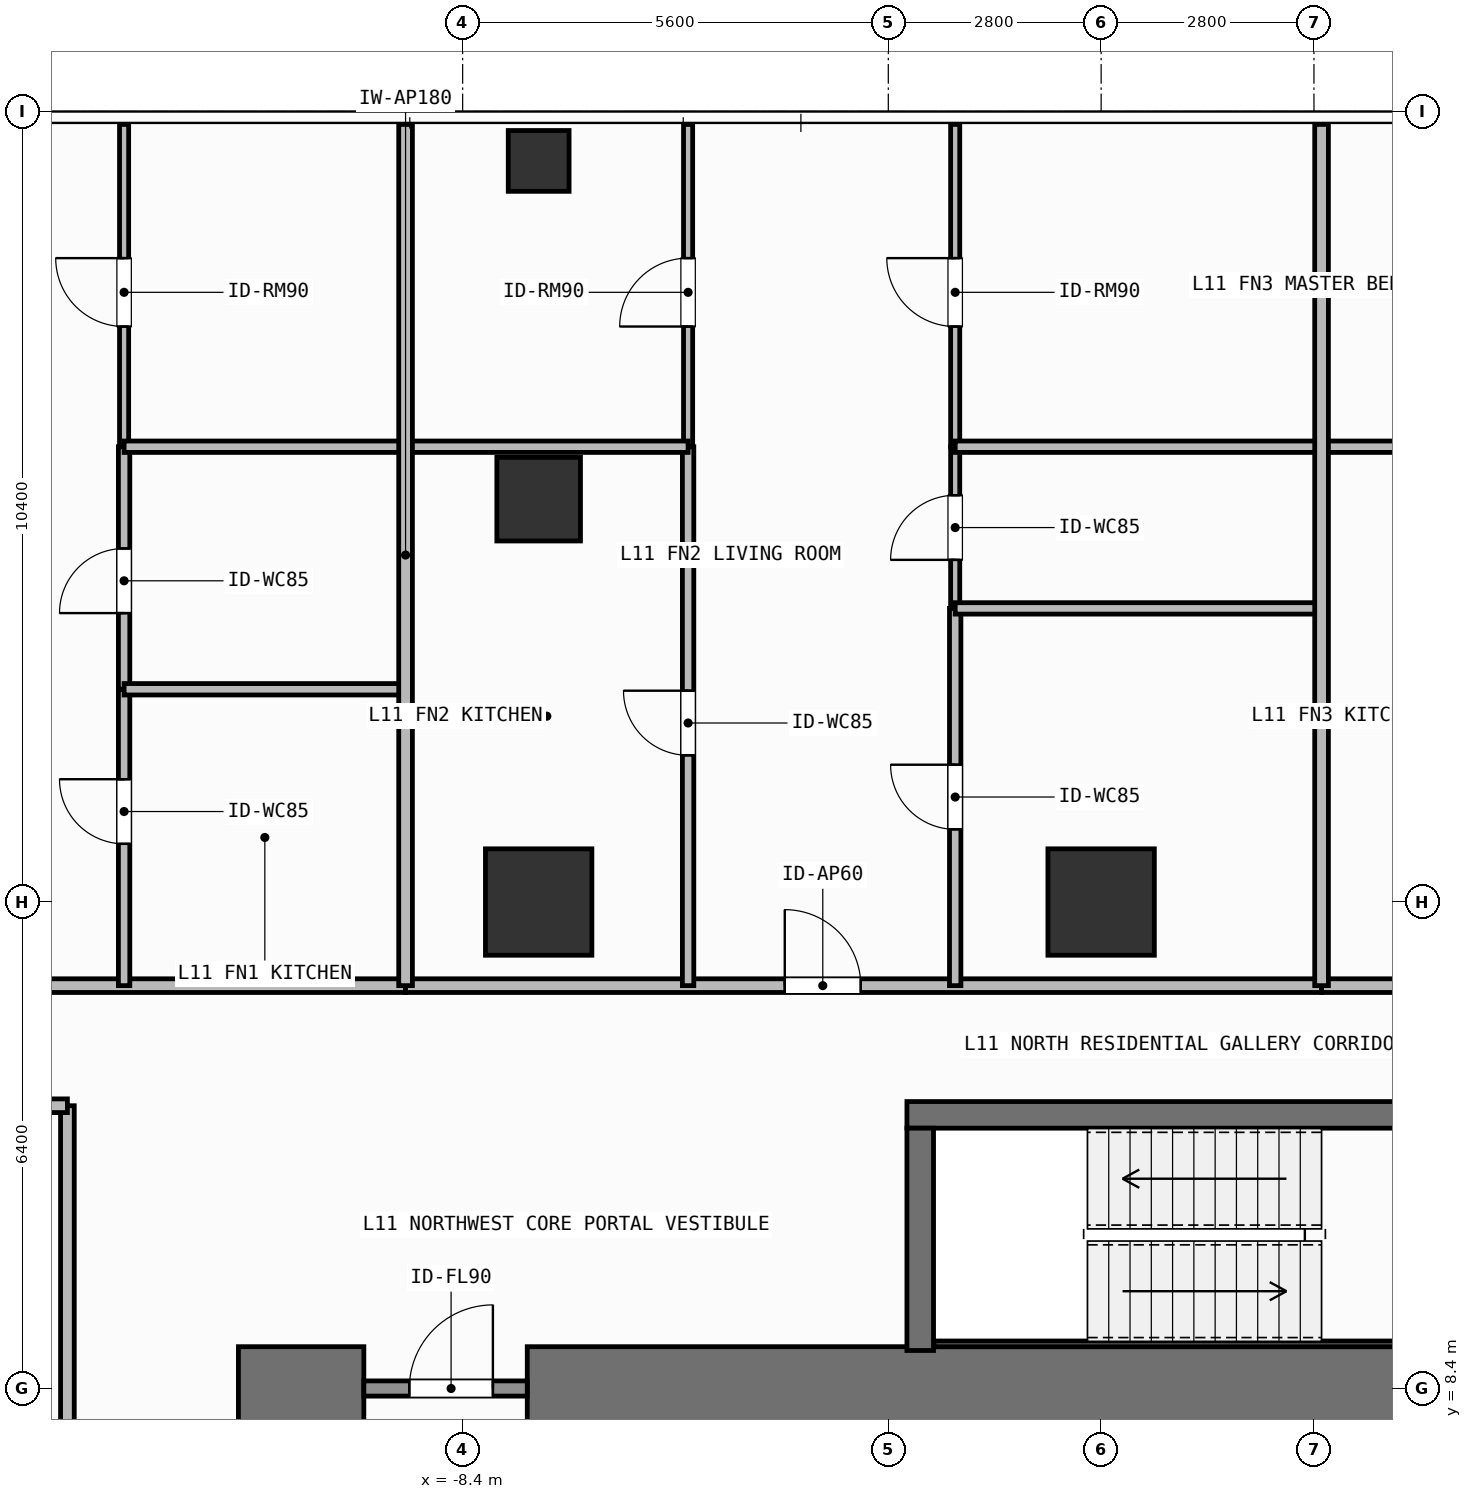
"""IFC4 building model, lengths in metres.
Left out: names, types, materials, properties, quantities, classifications, styles, units other than length and angle.
Written with IfcOpenShell. Run it as: python <this file> out.ifc"""

import sys

from ifc_helpers import new_model, si_unit, direction, frame, frame_2d, origin, origin_2d, place, context, subcontext, project, spatial, rectangle, hollow_rectangle, extrude, element, fill, save


model = new_model("IFC4")
c1 = context("Model", 3, precision=1e-05, world=origin(), true_north=direction((0.0, 1.0)))
c2 = subcontext(c1, "Body", "Model", "MODEL_VIEW")
j1 = project(units=[si_unit("LENGTHUNIT", "METRE"), si_unit("PLANEANGLEUNIT", "RADIAN")], contexts=[c1])
p1 = place(None, origin())
s1 = spatial("IfcSite", under=j1, at=p1, CompositionType="ELEMENT")
p2 = place(p1, origin())
s2 = spatial("IfcBuilding", under=s1, at=p2, CompositionType="ELEMENT")
p3 = place(p2, frame((0.0, 0.0, 42.3)))
s3 = spatial("IfcBuildingStorey", under=s2, at=p3, CompositionType="ELEMENT", Elevation=42.3)
p4 = place(p3, frame((-11.35, 8.4, 0.0), z_axis=(0.0, 0.0, 1.0), x_axis=(1.0, 0.0, 0.0)))
e1 = element("IfcWall", 1, at=p4, inside=s3, PredefinedType="SHEAR", context=c2, shape_type="SweptSolid", body=[
    extrude(rectangle(XDim=1.65, YDim=1.1, at=frame_2d((0.825, 0.0))), origin(), (0.0, 0.0, 1.0), 3.9),
])
p5 = place(p3, frame((-7.55, 8.4, 0.0), z_axis=(0.0, 0.0, 1.0), x_axis=(1.0, 0.0, 0.0)))
e2 = element("IfcWall", 2, at=p5, inside=s3, PredefinedType="SHEAR", context=c2, shape_type="SweptSolid", body=[
    extrude(rectangle(XDim=16.5, YDim=1.1, at=frame_2d((8.25, 0.0))), origin(), (0.0, 0.0, 1.0), 3.9),
])
p6 = place(p3, frame((-2.555, 12.0, 0.0), z_axis=(0.0, 0.0, 1.0), x_axis=(1.0, 0.0, 0.0)))
e3 = element("IfcWall", 3, at=p6, inside=s3, PredefinedType="SHEAR", context=c2, shape_type="SweptSolid", body=[
    extrude(rectangle(XDim=7.31, YDim=0.35, at=frame_2d((3.655, 0.0))), origin(), (0.0, 0.0, 1.0), 3.9),
])
p7 = place(p3, frame((-2.2, 8.988, 0.0), z_axis=(0.0, 0.0, 1.0), x_axis=(1.0, 0.0, 0.0)))
e4 = element("IfcWall", 4, at=p7, inside=s3, PredefinedType="SHEAR", context=c2, shape_type="SweptSolid", body=[
    extrude(rectangle(XDim=6.6, YDim=0.075, at=frame_2d((3.3, 0.0))), origin(), (0.0, 0.0, 1.0), 3.9),
])
p8 = place(p3, frame((-2.38, 8.9, 0.0), z_axis=(0.0, 0.0, 1.0), x_axis=(0.0, 1.0, 0.0)))
e5 = element("IfcWall", 5, at=p8, inside=s3, PredefinedType="SHEAR", context=c2, shape_type="SweptSolid", body=[
    extrude(rectangle(XDim=2.925, YDim=0.35, at=frame_2d((1.462, 0.0))), origin(), (0.0, 0.0, 1.0), 3.9),
])
for number, where, z_axis, x_axis in (
    (6, (-7.4, 14.8, 0.0), (0.0, 0.0, 1.0), (1.0, 0.0, 0.0)),
    (7, (0.0, 14.8, 0.0), (0.0, 0.0, 1.0), (1.0, 0.0, 0.0)),
):
    element("IfcColumn", number, at=place(p3, frame(where, z_axis=z_axis, x_axis=x_axis)), inside=s3, PredefinedType="COLUMN", context=c2, shape_type="SweptSolid", body=[
        extrude(rectangle(XDim=1.4, YDim=1.4, at=origin_2d()), origin(), (0.0, 0.0, 1.0), 3.9),
    ])
p9 = place(p3, frame((-7.4, 20.1, 0.0), z_axis=(0.0, 0.0, 1.0), x_axis=(1.0, 0.0, 0.0)))
e8 = element("IfcColumn", 8, at=p9, inside=s3, PredefinedType="COLUMN", context=c2, shape_type="SweptSolid", body=[
    extrude(rectangle(XDim=1.1, YDim=1.1, at=origin_2d()), origin(), (0.0, 0.0, 1.0), 3.9),
])
p10 = place(p3, frame((-7.4, 24.55, 0.0), z_axis=(0.0, 0.0, 1.0), x_axis=(1.0, 0.0, 0.0)))
e9 = element("IfcColumn", 9, at=p10, inside=s3, PredefinedType="COLUMN", context=c2, shape_type="SweptSolid", body=[
    extrude(hollow_rectangle(XDim=0.8, YDim=0.8, WallThickness=0.036, at=origin_2d()), origin(), (0.0, 0.0, 1.0), 3.9),
])
p11 = place(p3, frame((-9.7, 8.4, 0.0), z_axis=(0.0, 0.0, 1.0), x_axis=(1.0, 0.0, 0.0)))
e10 = element("IfcWall", 10, at=p11, inside=s3, PredefinedType="SOLIDWALL", context=c2, shape_type="SweptSolid", body=[
    extrude(rectangle(XDim=2.15, YDim=0.2, at=frame_2d((1.075, 0.0))), origin(), (0.0, 0.0, 1.0), 2.72),
])
p12 = place(p11, frame((0.598, 0.0, 0.0)))
e11 = element("IfcOpeningElement", 11, at=p12, cuts=e10, PredefinedType="OPENING", context=c2, shape_type="SweptSolid", body=[
    extrude(rectangle(XDim=1.1, YDim=2.15, at=frame_2d((0.55, 1.075))), frame((0.0, 0.11, 0.0), z_axis=(0.0, -1.0, 0.0), x_axis=(1.0, 0.0, 0.0)), (0.0, 0.0, 1.0), 0.22),
])
p13 = place(p3, frame((-18.62, 13.7, 0.0), z_axis=(0.0, 0.0, 1.0), x_axis=(1.0, 0.0, 0.0)))
e12 = element("IfcWall", 12, at=p13, inside=s3, PredefinedType="PARTITIONING", context=c2, shape_type="SweptSolid", body=[
    extrude(rectangle(XDim=9.469, YDim=0.18, at=frame_2d((4.735, 0.0))), origin(), (0.0, 0.0, 1.0), 3.68),
])
p14 = place(p13, frame((1.931, 0.0, 0.0)))
e13 = element("IfcOpeningElement", 13, at=p14, cuts=e12, PredefinedType="OPENING", context=c2, shape_type="SweptSolid", body=[
    extrude(rectangle(XDim=1.0, YDim=2.2, at=frame_2d((0.5, 1.1))), frame((0.0, 0.1, 0.0), z_axis=(0.0, -1.0, 0.0), x_axis=(1.0, 0.0, 0.0)), (0.0, 0.0, 1.0), 0.2),
])
p15 = place(p3, frame((-12.854, 13.7, 0.0), z_axis=(0.0, 0.0, 1.0), x_axis=(0.0, 1.0, 0.0)))
e14 = element("IfcWall", 14, at=p15, inside=s3, PredefinedType="PARTITIONING", context=c2, shape_type="SweptSolid", body=[
    extrude(rectangle(XDim=3.899, YDim=0.15, at=frame_2d((1.95, 0.0))), origin(), (0.0, 0.0, 1.0), 3.68),
])
p16 = place(p15, frame((1.865, 0.0, 0.0)))
e15 = element("IfcOpeningElement", 15, at=p16, cuts=e14, PredefinedType="OPENING", context=c2, shape_type="SweptSolid", body=[
    extrude(rectangle(XDim=0.85, YDim=2.1, at=frame_2d((0.425, 1.05))), frame((0.0, 0.085, 0.0), z_axis=(0.0, -1.0, 0.0), x_axis=(1.0, 0.0, 0.0)), (0.0, 0.0, 1.0), 0.17),
])
p17 = place(p3, frame((-12.854, 17.599, 0.0), z_axis=(0.0, 0.0, 1.0), x_axis=(0.0, 1.0, 0.0)))
e16 = element("IfcWall", 16, at=p17, inside=s3, PredefinedType="PARTITIONING", context=c2, shape_type="SweptSolid", body=[
    extrude(rectangle(XDim=3.191, YDim=0.15, at=frame_2d((1.595, 0.0))), origin(), (0.0, 0.0, 1.0), 3.68),
])
p18 = place(p17, frame((1.002, 0.0, 0.0)))
e17 = element("IfcOpeningElement", 17, at=p18, cuts=e16, PredefinedType="OPENING", context=c2, shape_type="SweptSolid", body=[
    extrude(rectangle(XDim=0.85, YDim=2.1, at=frame_2d((0.425, 1.05))), frame((0.0, 0.085, 0.0), z_axis=(0.0, -1.0, 0.0), x_axis=(1.0, 0.0, 0.0)), (0.0, 0.0, 1.0), 0.17),
])
p19 = place(p3, frame((-12.854, 20.79, 0.0), z_axis=(0.0, 0.0, 1.0), x_axis=(0.0, 1.0, 0.0)))
e18 = element("IfcWall", 18, at=p19, inside=s3, PredefinedType="PARTITIONING", context=c2, shape_type="SweptSolid", body=[
    extrude(rectangle(XDim=4.24, YDim=0.12, at=frame_2d((2.12, 0.0))), origin(), (0.0, 0.0, 1.0), 3.68),
])
p20 = place(p19, frame((1.581, 0.0, 0.0)))
e19 = element("IfcOpeningElement", 19, at=p20, cuts=e18, PredefinedType="OPENING", context=c2, shape_type="SweptSolid", body=[
    extrude(rectangle(XDim=0.9, YDim=2.1, at=frame_2d((0.45, 1.05))), frame((0.0, 0.07, 0.0), z_axis=(0.0, -1.0, 0.0), x_axis=(1.0, 0.0, 0.0)), (0.0, 0.0, 1.0), 0.14),
])
p21 = place(p3, frame((-9.151, 13.7, 0.0), z_axis=(0.0, 0.0, 1.0), x_axis=(1.0, 0.0, 0.0)))
e20 = element("IfcWall", 20, at=p21, inside=s3, PredefinedType="PARTITIONING", context=c2, shape_type="SweptSolid", body=[
    extrude(rectangle(XDim=12.051, YDim=0.18, at=frame_2d((6.025, 0.0))), origin(), (0.0, 0.0, 1.0), 3.68),
])
p22 = place(p21, frame((4.989, 0.0, 0.0)))
e21 = element("IfcOpeningElement", 21, at=p22, cuts=e20, PredefinedType="OPENING", context=c2, shape_type="SweptSolid", body=[
    extrude(rectangle(XDim=1.0, YDim=2.2, at=frame_2d((0.5, 1.1))), frame((0.0, 0.1, 0.0), z_axis=(0.0, -1.0, 0.0), x_axis=(1.0, 0.0, 0.0)), (0.0, 0.0, 1.0), 0.2),
])
p23 = place(p3, frame((-5.434, 13.7, 0.0), z_axis=(0.0, 0.0, 1.0), x_axis=(0.0, 1.0, 0.0)))
e22 = element("IfcWall", 22, at=p23, inside=s3, PredefinedType="PARTITIONING", context=c2, shape_type="SweptSolid", body=[
    extrude(rectangle(XDim=7.09, YDim=0.15, at=frame_2d((3.545, 0.0))), origin(), (0.0, 0.0, 1.0), 3.68),
])
p24 = place(p23, frame((3.03, 0.0, 0.0)))
e23 = element("IfcOpeningElement", 23, at=p24, cuts=e22, PredefinedType="OPENING", context=c2, shape_type="SweptSolid", body=[
    extrude(rectangle(XDim=0.85, YDim=2.1, at=frame_2d((0.425, 1.05))), frame((0.0, 0.085, 0.0), z_axis=(0.0, -1.0, 0.0), x_axis=(1.0, 0.0, 0.0)), (0.0, 0.0, 1.0), 0.17),
])
p25 = place(p3, frame((-5.434, 20.79, 0.0), z_axis=(0.0, 0.0, 1.0), x_axis=(0.0, 1.0, 0.0)))
e24 = element("IfcWall", 24, at=p25, inside=s3, PredefinedType="PARTITIONING", context=c2, shape_type="SweptSolid", body=[
    extrude(rectangle(XDim=4.24, YDim=0.12, at=frame_2d((2.12, 0.0))), origin(), (0.0, 0.0, 1.0), 3.68),
])
p26 = place(p25, frame((1.581, 0.0, 0.0)))
e25 = element("IfcOpeningElement", 25, at=p26, cuts=e24, PredefinedType="OPENING", context=c2, shape_type="SweptSolid", body=[
    extrude(rectangle(XDim=0.9, YDim=2.1, at=frame_2d((0.45, 1.05))), frame((0.0, 0.07, 0.0), z_axis=(0.0, -1.0, 0.0), x_axis=(1.0, 0.0, 0.0)), (0.0, 0.0, 1.0), 0.14),
])
p27 = place(p3, frame((-1.92, 13.7, 0.0), z_axis=(0.0, 0.0, 1.0), x_axis=(0.0, 1.0, 0.0)))
e26 = element("IfcWall", 26, at=p27, inside=s3, PredefinedType="PARTITIONING", context=c2, shape_type="SweptSolid", body=[
    extrude(rectangle(XDim=4.963, YDim=0.15, at=frame_2d((2.481, 0.0))), origin(), (0.0, 0.0, 1.0), 3.68),
])
p28 = place(p27, frame((2.056, 0.0, 0.0)))
e27 = element("IfcOpeningElement", 27, at=p28, cuts=e26, PredefinedType="OPENING", context=c2, shape_type="SweptSolid", body=[
    extrude(rectangle(XDim=0.85, YDim=2.1, at=frame_2d((0.425, 1.05))), frame((0.0, 0.085, 0.0), z_axis=(0.0, -1.0, 0.0), x_axis=(1.0, 0.0, 0.0)), (0.0, 0.0, 1.0), 0.17),
])
p29 = place(p3, frame((-1.92, 18.663, 0.0), z_axis=(0.0, 0.0, 1.0), x_axis=(0.0, 1.0, 0.0)))
e28 = element("IfcWall", 28, at=p29, inside=s3, PredefinedType="PARTITIONING", context=c2, shape_type="SweptSolid", body=[
    extrude(rectangle(XDim=2.127, YDim=0.12, at=frame_2d((1.063, 0.0))), origin(), (0.0, 0.0, 1.0), 3.68),
])
p30 = place(p29, frame((0.638, 0.0, 0.0)))
e29 = element("IfcOpeningElement", 29, at=p30, cuts=e28, PredefinedType="OPENING", context=c2, shape_type="SweptSolid", body=[
    extrude(rectangle(XDim=0.85, YDim=2.1, at=frame_2d((0.425, 1.05))), frame((0.0, 0.07, 0.0), z_axis=(0.0, -1.0, 0.0), x_axis=(1.0, 0.0, 0.0)), (0.0, 0.0, 1.0), 0.14),
])
p31 = place(p3, frame((-1.92, 20.79, 0.0), z_axis=(0.0, 0.0, 1.0), x_axis=(0.0, 1.0, 0.0)))
e30 = element("IfcWall", 30, at=p31, inside=s3, PredefinedType="PARTITIONING", context=c2, shape_type="SweptSolid", body=[
    extrude(rectangle(XDim=4.24, YDim=0.12, at=frame_2d((2.12, 0.0))), origin(), (0.0, 0.0, 1.0), 3.68),
])
p32 = place(p31, frame((1.581, 0.0, 0.0)))
e31 = element("IfcOpeningElement", 31, at=p32, cuts=e30, PredefinedType="OPENING", context=c2, shape_type="SweptSolid", body=[
    extrude(rectangle(XDim=0.9, YDim=2.1, at=frame_2d((0.45, 1.05))), frame((0.0, 0.07, 0.0), z_axis=(0.0, -1.0, 0.0), x_axis=(1.0, 0.0, 0.0)), (0.0, 0.0, 1.0), 0.14),
])
p33 = place(p3, frame((2.9, 13.7, 0.0), z_axis=(0.0, 0.0, 1.0), x_axis=(1.0, 0.0, 0.0)))
e32 = element("IfcWall", 32, at=p33, inside=s3, PredefinedType="PARTITIONING", context=c2, shape_type="SweptSolid", body=[
    extrude(rectangle(XDim=12.051, YDim=0.18, at=frame_2d((6.025, 0.0))), origin(), (0.0, 0.0, 1.0), 3.68),
])
p34 = place(p33, frame((5.347, 0.0, 0.0)))
e33 = element("IfcOpeningElement", 33, at=p34, cuts=e32, PredefinedType="OPENING", context=c2, shape_type="SweptSolid", body=[
    extrude(rectangle(XDim=1.0, YDim=2.2, at=frame_2d((0.5, 1.1))), frame((0.0, 0.1, 0.0), z_axis=(0.0, -1.0, 0.0), x_axis=(1.0, 0.0, 0.0)), (0.0, 0.0, 1.0), 0.2),
])
p35 = place(p3, frame((-13.6, -12.12, 0.0), z_axis=(0.0, 0.0, 1.0), x_axis=(0.0, 1.0, 0.0)))
e34 = element("IfcWall", 34, at=p35, inside=s3, PredefinedType="PARTITIONING", context=c2, shape_type="SweptSolid", body=[
    extrude(rectangle(XDim=24.24, YDim=0.18, at=frame_2d((12.12, 0.0))), origin(), (0.0, 0.0, 1.0), 3.68),
])
p36 = place(p35, frame((9.829, 0.0, 0.0)))
e35 = element("IfcOpeningElement", 35, at=p36, cuts=e34, PredefinedType="OPENING", context=c2, shape_type="SweptSolid", body=[
    extrude(rectangle(XDim=1.0, YDim=2.2, at=frame_2d((0.5, 1.1))), frame((0.0, 0.1, 0.0), z_axis=(0.0, -1.0, 0.0), x_axis=(1.0, 0.0, 0.0)), (0.0, 0.0, 1.0), 0.2),
])
for number, where, z_axis, x_axis in (
    (36, (-12.854, 17.599, 0.0), (0.0, 0.0, 1.0), (1.0, 0.0, 0.0)),
    (37, (-12.854, 20.79, 0.0), (0.0, 0.0, 1.0), (1.0, 0.0, 0.0)),
):
    element("IfcWall", number, at=place(p3, frame(where, z_axis=z_axis, x_axis=x_axis)), inside=s3, PredefinedType="PARTITIONING", context=c2, shape_type="SweptSolid", body=[
        extrude(rectangle(XDim=3.703, YDim=0.15, at=frame_2d((1.852, 0.0))), origin(), (0.0, 0.0, 1.0), 3.68),
    ])
p37 = place(p3, frame((-9.151, 20.79, 0.0), z_axis=(0.0, 0.0, 1.0), x_axis=(1.0, 0.0, 0.0)))
e38 = element("IfcWall", 38, at=p37, inside=s3, PredefinedType="PARTITIONING", context=c2, shape_type="SweptSolid", body=[
    extrude(rectangle(XDim=3.717, YDim=0.15, at=frame_2d((1.858, 0.0))), origin(), (0.0, 0.0, 1.0), 3.68),
])
for number, where, z_axis, x_axis in (
    (39, (-1.92, 18.663, 0.0), (0.0, 0.0, 1.0), (1.0, 0.0, 0.0)),
    (40, (-1.92, 20.79, 0.0), (0.0, 0.0, 1.0), (1.0, 0.0, 0.0)),
):
    element("IfcWall", number, at=place(p3, frame(where, z_axis=z_axis, x_axis=x_axis)), inside=s3, PredefinedType="PARTITIONING", context=c2, shape_type="SweptSolid", body=[
        extrude(rectangle(XDim=4.82, YDim=0.15, at=frame_2d((2.41, 0.0))), origin(), (0.0, 0.0, 1.0), 3.68),
    ])
p38 = place(p3, frame((-9.151, 13.7, 0.0), z_axis=(0.0, 0.0, 1.0), x_axis=(0.0, 1.0, 0.0)))
e41 = element("IfcWall", 41, at=p38, inside=s3, PredefinedType="PARTITIONING", context=c2, shape_type="SweptSolid", body=[
    extrude(rectangle(XDim=11.33, YDim=0.18, at=frame_2d((5.665, 0.0))), origin(), (0.0, 0.0, 1.0), 3.68),
])
p39 = place(p3, frame((2.9, 20.79, 0.0), z_axis=(0.0, 0.0, 1.0), x_axis=(1.0, 0.0, 0.0)))
e42 = element("IfcWall", 42, at=p39, inside=s3, PredefinedType="PARTITIONING", context=c2, shape_type="SweptSolid", body=[
    extrude(rectangle(XDim=2.85, YDim=0.15, at=frame_2d((1.425, 0.0))), origin(), (0.0, 0.0, 1.0), 3.68),
])
p40 = place(p3, frame((2.9, 13.7, 0.0), z_axis=(0.0, 0.0, 1.0), x_axis=(0.0, 1.0, 0.0)))
e43 = element("IfcWall", 43, at=p40, inside=s3, PredefinedType="PARTITIONING", context=c2, shape_type="SweptSolid", body=[
    extrude(rectangle(XDim=11.33, YDim=0.18, at=frame_2d((5.665, 0.0))), origin(), (0.0, 0.0, 1.0), 3.68),
])
p41 = place(p3, frame((-22.13, 12.12, 0.0), z_axis=(0.0, 0.0, 1.0), x_axis=(1.0, 0.0, 0.0)))
e44 = element("IfcWall", 44, at=p41, inside=s3, PredefinedType="PARTITIONING", context=c2, shape_type="SweptSolid", body=[
    extrude(rectangle(XDim=8.53, YDim=0.18, at=frame_2d((4.265, 0.0))), origin(), (0.0, 0.0, 1.0), 3.68),
])
p42 = place(p12, origin())
e45 = element("IfcDoor", 45, at=p42, inside=s3, OperationType="SINGLE_SWING_RIGHT", PredefinedType="DOOR", context=c2, shape_type="SweptSolid", body=[
    extrude(rectangle(XDim=1.1, YDim=2.15, at=frame_2d((0.55, 1.075))), frame((0.0, 0.025, 0.0), z_axis=(0.0, -1.0, 0.0), x_axis=(1.0, 0.0, 0.0)), (0.0, 0.0, 1.0), 0.05),
])
fill(e11, e45)
p43 = place(p16, origin())
e46 = element("IfcDoor", 46, at=p43, inside=s3, OperationType="SINGLE_SWING_RIGHT", PredefinedType="DOOR", context=c2, shape_type="SweptSolid", body=[
    extrude(rectangle(XDim=0.85, YDim=2.1, at=frame_2d((0.425, 1.05))), frame((0.0, 0.025, 0.0), z_axis=(0.0, -1.0, 0.0), x_axis=(1.0, 0.0, 0.0)), (0.0, 0.0, 1.0), 0.05),
])
fill(e15, e46)
p44 = place(p18, origin())
e47 = element("IfcDoor", 47, at=p44, inside=s3, OperationType="SINGLE_SWING_LEFT", PredefinedType="DOOR", context=c2, shape_type="SweptSolid", body=[
    extrude(rectangle(XDim=0.85, YDim=2.1, at=frame_2d((0.425, 1.05))), frame((0.0, 0.025, 0.0), z_axis=(0.0, -1.0, 0.0), x_axis=(1.0, 0.0, 0.0)), (0.0, 0.0, 1.0), 0.05),
])
fill(e17, e47)
p45 = place(p20, origin())
e48 = element("IfcDoor", 48, at=p45, inside=s3, OperationType="SINGLE_SWING_RIGHT", PredefinedType="DOOR", context=c2, shape_type="SweptSolid", body=[
    extrude(rectangle(XDim=0.9, YDim=2.1, at=frame_2d((0.45, 1.05))), frame((0.0, 0.025, 0.0), z_axis=(0.0, -1.0, 0.0), x_axis=(1.0, 0.0, 0.0)), (0.0, 0.0, 1.0), 0.05),
])
fill(e19, e48)
p46 = place(p22, origin())
e49 = element("IfcDoor", 49, at=p46, inside=s3, OperationType="SINGLE_SWING_LEFT", PredefinedType="DOOR", context=c2, shape_type="SweptSolid", body=[
    extrude(rectangle(XDim=1.0, YDim=2.2, at=frame_2d((0.5, 1.1))), frame((0.0, 0.025, 0.0), z_axis=(0.0, -1.0, 0.0), x_axis=(1.0, 0.0, 0.0)), (0.0, 0.0, 1.0), 0.05),
])
fill(e21, e49)
p47 = place(p24, origin())
e50 = element("IfcDoor", 50, at=p47, inside=s3, OperationType="SINGLE_SWING_RIGHT", PredefinedType="DOOR", context=c2, shape_type="SweptSolid", body=[
    extrude(rectangle(XDim=0.85, YDim=2.1, at=frame_2d((0.425, 1.05))), frame((0.0, 0.025, 0.0), z_axis=(0.0, -1.0, 0.0), x_axis=(1.0, 0.0, 0.0)), (0.0, 0.0, 1.0), 0.05),
])
fill(e23, e50)
p48 = place(p26, origin())
e51 = element("IfcDoor", 51, at=p48, inside=s3, OperationType="SINGLE_SWING_LEFT", PredefinedType="DOOR", context=c2, shape_type="SweptSolid", body=[
    extrude(rectangle(XDim=0.9, YDim=2.1, at=frame_2d((0.45, 1.05))), frame((0.0, 0.025, 0.0), z_axis=(0.0, -1.0, 0.0), x_axis=(1.0, 0.0, 0.0)), (0.0, 0.0, 1.0), 0.05),
])
fill(e25, e51)
p49 = place(p28, origin())
e52 = element("IfcDoor", 52, at=p49, inside=s3, OperationType="SINGLE_SWING_RIGHT", PredefinedType="DOOR", context=c2, shape_type="SweptSolid", body=[
    extrude(rectangle(XDim=0.85, YDim=2.1, at=frame_2d((0.425, 1.05))), frame((0.0, 0.025, 0.0), z_axis=(0.0, -1.0, 0.0), x_axis=(1.0, 0.0, 0.0)), (0.0, 0.0, 1.0), 0.05),
])
fill(e27, e52)
p50 = place(p30, origin())
e53 = element("IfcDoor", 53, at=p50, inside=s3, OperationType="SINGLE_SWING_LEFT", PredefinedType="DOOR", context=c2, shape_type="SweptSolid", body=[
    extrude(rectangle(XDim=0.85, YDim=2.1, at=frame_2d((0.425, 1.05))), frame((0.0, 0.025, 0.0), z_axis=(0.0, -1.0, 0.0), x_axis=(1.0, 0.0, 0.0)), (0.0, 0.0, 1.0), 0.05),
])
fill(e29, e53)
p51 = place(p32, origin())
e54 = element("IfcDoor", 54, at=p51, inside=s3, OperationType="SINGLE_SWING_RIGHT", PredefinedType="DOOR", context=c2, shape_type="SweptSolid", body=[
    extrude(rectangle(XDim=0.9, YDim=2.1, at=frame_2d((0.45, 1.05))), frame((0.0, 0.025, 0.0), z_axis=(0.0, -1.0, 0.0), x_axis=(1.0, 0.0, 0.0)), (0.0, 0.0, 1.0), 0.05),
])
fill(e31, e54)
save(model, sys.argv[1])
